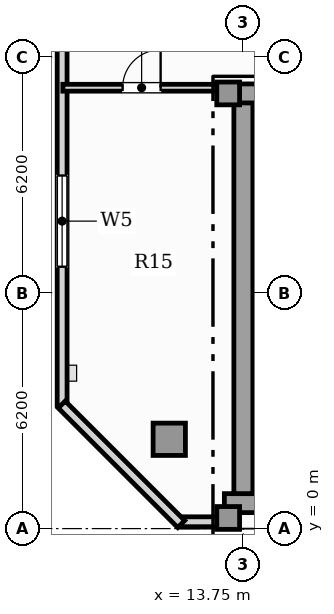
"""IFC4 building model, lengths in metres.
Left out: names, types, materials, properties, quantities, classifications, styles, units other than length and angle.
Written with IfcOpenShell. Run it as: python <this file> out.ifc"""

import sys

from ifc_helpers import new_model, si_unit, direction, frame, frame_2d, origin, origin_2d, place, context, subcontext, project, spatial, rectangle, hollow_rectangle, extrude, element, fill, save


model = new_model("IFC4")
c1 = context("Model", 3, precision=1e-05, world=origin(), true_north=direction((0.0, 1.0)))
c2 = subcontext(c1, "Body", "Model", "MODEL_VIEW")
j1 = project(units=[si_unit("LENGTHUNIT", "METRE"), si_unit("PLANEANGLEUNIT", "RADIAN")], contexts=[c1])
p1 = place(None, origin())
s1 = spatial("IfcSite", under=j1, at=p1, CompositionType="ELEMENT")
p2 = place(p1, origin())
s2 = spatial("IfcBuilding", under=s1, at=p2, CompositionType="ELEMENT")
p3 = place(p2, frame((0.0, 0.0, 308.0)))
s3 = spatial("IfcBuildingStorey", under=s2, at=p3, CompositionType="ELEMENT", Elevation=308.0)
p4 = place(p3, frame((13.25, 0.67, 0.0), z_axis=(0.0, 0.0, 1.0), x_axis=(1.0, 0.0, 0.0)))
e1 = element("IfcWall", 1, at=p4, inside=s3, PredefinedType="SHEAR", context=c2, shape_type="SweptSolid", body=[
    extrude(rectangle(XDim=31.0, YDim=0.5, at=frame_2d((15.5, 0.0))), origin(), (0.0, 0.0, 1.0), 4.85),
])
p5 = place(p3, frame((13.75, 0.92, 0.0), z_axis=(0.0, 0.0, 1.0), x_axis=(0.0, 1.0, 0.0)))
e2 = element("IfcWall", 2, at=p5, inside=s3, PredefinedType="SHEAR", context=c2, shape_type="SweptSolid", body=[
    extrude(rectangle(XDim=10.53, YDim=0.5, at=frame_2d((5.265, 0.0))), origin(), (0.0, 0.0, 1.0), 4.85),
])
p6 = place(p3, frame((13.25, 11.45, 0.0), z_axis=(0.0, 0.0, 1.0), x_axis=(1.0, 0.0, 0.0)))
e3 = element("IfcWall", 3, at=p6, inside=s3, PredefinedType="SHEAR", context=c2, shape_type="SweptSolid", body=[
    extrude(rectangle(XDim=2.95, YDim=0.5, at=frame_2d((1.475, 0.0))), origin(), (0.0, 0.0, 1.0), 4.85),
])
for number, where, z_axis, x_axis in (
    (4, (13.35, 0.28, 0.0), (0.0, 0.0, 1.0), (1.0, 0.0, 0.0)),
    (5, (13.35, 11.45, 0.0), (0.0, 0.0, 1.0), (1.0, 0.0, 0.0)),
):
    element("IfcColumn", number, at=place(p3, frame(where, z_axis=z_axis, x_axis=x_axis)), inside=s3, PredefinedType="COLUMN", context=c2, shape_type="SweptSolid", body=[
        extrude(rectangle(XDim=0.6, YDim=0.6, at=origin_2d()), origin(), (0.0, 0.0, 1.0), 5.05),
    ])
p7 = place(p3, frame((11.8, 2.35, 0.0), z_axis=(0.0, 0.0, 1.0), x_axis=(1.0, 0.0, 0.0)))
e6 = element("IfcColumn", 6, at=p7, inside=s3, PredefinedType="USERDEFINED", context=c2, shape_type="SweptSolid", body=[
    extrude(hollow_rectangle(XDim=0.85, YDim=0.85, WallThickness=0.05, at=origin_2d()), origin(), (0.0, 0.0, 1.0), 5.05),
])
p8 = place(p3, frame((12.091, 0.18, 0.0), z_axis=(0.0, 0.0, 1.0), x_axis=(1.0, 0.0, 0.0)))
e7 = element("IfcWall", 7, at=p8, inside=s3, PredefinedType="SOLIDWALL", context=c2, shape_type="SweptSolid", body=[
    extrude(rectangle(XDim=1.159, YDim=0.26, at=frame_2d((0.58, 0.0))), origin(), (0.0, 0.0, 1.0), 4.85),
])
p9 = place(p3, frame((8.981, 30.053, 0.0), z_axis=(0.0, 0.0, 1.0), x_axis=(0.0, -1.0, 0.0)))
e8 = element("IfcWall", 8, at=p9, inside=s3, PredefinedType="SOLIDWALL", context=c2, shape_type="SweptSolid", body=[
    extrude(rectangle(XDim=26.813, YDim=0.26, at=frame_2d((13.406, 0.0))), origin(), (0.0, 0.0, 1.0), 4.85),
])
p10 = place(p9, frame((20.763, 0.0, 0.85)))
e9 = element("IfcOpeningElement", 9, at=p10, cuts=e8, PredefinedType="OPENING", context=c2, shape_type="SweptSolid", body=[
    extrude(rectangle(XDim=2.4, YDim=2.0, at=frame_2d((1.2, 1.0))), frame((0.0, 0.14, 0.0), z_axis=(0.0, -1.0, 0.0), x_axis=(1.0, 0.0, 0.0)), (0.0, 0.0, 1.0), 0.28),
])
p11 = place(p9, frame((1.853, 0.0, 0.95)))
e10 = element("IfcOpeningElement", 10, at=p11, cuts=e8, PredefinedType="OPENING", context=c2, shape_type="SweptSolid", body=[
    extrude(rectangle(XDim=0.9, YDim=1.5, at=frame_2d((0.45, 0.75))), frame((0.0, 0.14, 0.0), z_axis=(0.0, -1.0, 0.0), x_axis=(1.0, 0.0, 0.0)), (0.0, 0.0, 1.0), 0.28),
])
p12 = place(p9, frame((12.001, 0.0, 0.9)))
e11 = element("IfcOpeningElement", 11, at=p12, cuts=e8, PredefinedType="OPENING", context=c2, shape_type="SweptSolid", body=[
    extrude(rectangle(XDim=1.5, YDim=1.95, at=frame_2d((0.75, 0.975))), frame((0.0, 0.14, 0.0), z_axis=(0.0, -1.0, 0.0), x_axis=(1.0, 0.0, 0.0)), (0.0, 0.0, 1.0), 0.28),
])
p13 = place(p9, frame((6.048, 0.0, 0.9)))
e12 = element("IfcOpeningElement", 12, at=p13, cuts=e8, PredefinedType="OPENING", context=c2, shape_type="SweptSolid", body=[
    extrude(rectangle(XDim=1.5, YDim=1.95, at=frame_2d((0.75, 0.975))), frame((0.0, 0.14, 0.0), z_axis=(0.0, -1.0, 0.0), x_axis=(1.0, 0.0, 0.0)), (0.0, 0.0, 1.0), 0.28),
])
p14 = place(p3, frame((8.971, 3.264, 0.0), z_axis=(0.0, 0.0, 1.0), x_axis=(0.707106781187, -0.707106781187, 0.0)))
e13 = element("IfcWall", 13, at=p14, inside=s3, PredefinedType="SOLIDWALL", context=c2, shape_type="SweptSolid", body=[
    extrude(rectangle(XDim=4.446, YDim=0.26, at=frame_2d((2.223, 0.0))), origin(), (0.0, 0.0, 1.0), 4.85),
])
p15 = place(p3, frame((14.04, 8.52, 0.0), z_axis=(0.0, 0.0, 1.0), x_axis=(1.0, 0.0, 0.0)))
e14 = element("IfcWall", 14, at=p15, inside=s3, PredefinedType="SOLIDWALL", context=c2, shape_type="SweptSolid", body=[
    extrude(rectangle(XDim=3.4, YDim=0.22, at=frame_2d((1.7, 0.0))), origin(), (0.0, 0.0, 1.0), 4.85),
])
p16 = place(p15, frame((1.125, 0.0, 0.0)))
e15 = element("IfcOpeningElement", 15, at=p16, cuts=e14, PredefinedType="OPENING", context=c2, shape_type="SweptSolid", body=[
    extrude(rectangle(XDim=1.15, YDim=2.2, at=frame_2d((0.575, 1.1))), frame((0.0, 0.12, 0.0), z_axis=(0.0, -1.0, 0.0), x_axis=(1.0, 0.0, 0.0)), (0.0, 0.0, 1.0), 0.24),
])
p17 = place(p3, frame((9.0, 11.6, 0.0), z_axis=(0.0, 0.0, 1.0), x_axis=(1.0, 0.0, 0.0)))
e16 = element("IfcWall", 16, at=p17, inside=s3, PredefinedType="PARTITIONING", context=c2, shape_type="SweptSolid", body=[
    extrude(rectangle(XDim=4.145, YDim=0.18, at=frame_2d((2.072, 0.0))), origin(), (0.0, 0.0, 1.0), 4.85),
])
p18 = place(p17, frame((1.573, 0.0, 0.0)))
e17 = element("IfcOpeningElement", 17, at=p18, cuts=e16, PredefinedType="OPENING", context=c2, shape_type="SweptSolid", body=[
    extrude(rectangle(XDim=1.0, YDim=2.15, at=frame_2d((0.5, 1.075))), frame((0.0, 0.1, 0.0), z_axis=(0.0, -1.0, 0.0), x_axis=(1.0, 0.0, 0.0)), (0.0, 0.0, 1.0), 0.2),
])
p19 = place(p10, origin())
e18 = element("IfcWindow", 18, at=p19, inside=s3, PartitioningType="SINGLE_PANEL", PredefinedType="WINDOW", context=c2, shape_type="SweptSolid", body=[
    extrude(rectangle(XDim=2.4, YDim=2.0, at=frame_2d((1.2, 1.0))), frame((0.0, 0.03, 0.0), z_axis=(0.0, -1.0, 0.0), x_axis=(1.0, 0.0, 0.0)), (0.0, 0.0, 1.0), 0.06),
])
fill(e9, e18)
p20 = place(p18, origin())
e19 = element("IfcDoor", 19, at=p20, inside=s3, OperationType="SINGLE_SWING_RIGHT", PredefinedType="DOOR", context=c2, shape_type="SweptSolid", body=[
    extrude(rectangle(XDim=1.0, YDim=2.15, at=frame_2d((0.5, 1.075))), frame((0.0, 0.025, 0.0), z_axis=(0.0, -1.0, 0.0), x_axis=(1.0, 0.0, 0.0)), (0.0, 0.0, 1.0), 0.05),
])
fill(e17, e19)
save(model, sys.argv[1])
